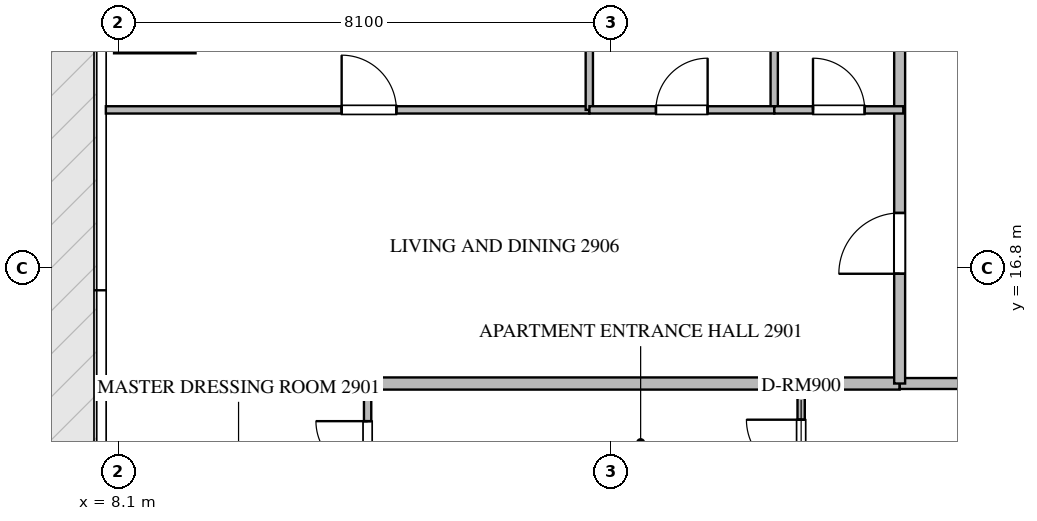
"""IFC4 building model, lengths in metres.
Left out: names, types, materials, properties, quantities, classifications, styles, units other than length and angle.
Written with IfcOpenShell. Run it as: python <this file> out.ifc"""

import sys

from ifc_helpers import new_model, si_unit, direction, frame, frame_2d, origin, place, context, subcontext, project, spatial, rectangle, extrude, source, transform, mapped, element, fill, save


model = new_model("IFC4")
c1 = context("Model", 3, precision=1e-05, world=origin(), true_north=direction((0.0, 1.0)))
c2 = subcontext(c1, "Body", "Model", "MODEL_VIEW")
j1 = project(units=[si_unit("LENGTHUNIT", "METRE"), si_unit("PLANEANGLEUNIT", "RADIAN")], contexts=[c1])
p1 = place(None, origin())
s1 = spatial("IfcSite", under=j1, at=p1, CompositionType="ELEMENT")
p2 = place(p1, origin())
s2 = spatial("IfcBuilding", under=s1, at=p2, CompositionType="ELEMENT")
p3 = place(p2, frame((0.0, 0.0, 120.15)))
s3 = spatial("IfcBuildingStorey", under=s2, at=p3, CompositionType="ELEMENT", Elevation=120.15)
p4 = place(p3, frame((7.882, 14.9, 0.0), z_axis=(0.0, 0.0, 1.0), x_axis=(1.0, 0.0, 0.0)))
e1 = element("IfcWall", 1, at=p4, inside=s3, PredefinedType="PARTITIONING", context=c2, shape_type="SweptSolid", body=[
    extrude(rectangle(XDim=13.068, YDim=0.2, at=frame_2d((6.534, 0.0))), origin(), (0.0, 0.0, 1.0), 3.49),
])
p5 = place(p3, frame((20.952, 14.9, 0.0), z_axis=(0.0, 0.0, 1.0), x_axis=(1.0, 0.0, 0.0)))
e2 = element("IfcWall", 2, at=p5, inside=s3, PredefinedType="PARTITIONING", context=c2, shape_type="SweptSolid", body=[
    extrude(rectangle(XDim=22.896, YDim=0.18, at=frame_2d((11.448, 0.0))), origin(), (0.0, 0.0, 1.0), 3.49),
])
p6 = place(p5, frame((2.781, 0.0, 0.0)))
e3 = element("IfcOpeningElement", 3, at=p6, cuts=e2, PredefinedType="OPENING", context=c2, shape_type="SweptSolid", body=[
    extrude(rectangle(XDim=1.0, YDim=2.15, at=frame_2d((0.5, 1.075))), frame((0.0, 0.1, 0.0), z_axis=(0.0, -1.0, 0.0), x_axis=(1.0, 0.0, 0.0)), (0.0, 0.0, 1.0), 0.2),
])
p7 = place(p5, frame((7.16, 0.0, 0.0)))
e4 = element("IfcOpeningElement", 4, at=p7, cuts=e2, PredefinedType="OPENING", context=c2, shape_type="SweptSolid", body=[
    extrude(rectangle(XDim=1.0, YDim=2.15, at=frame_2d((0.5, 1.075))), frame((0.0, 0.1, 0.0), z_axis=(0.0, -1.0, 0.0), x_axis=(1.0, 0.0, 0.0)), (0.0, 0.0, 1.0), 0.2),
])
p8 = place(p5, frame((19.115, 0.0, 0.0)))
e5 = element("IfcOpeningElement", 5, at=p8, cuts=e2, PredefinedType="OPENING", context=c2, shape_type="SweptSolid", body=[
    extrude(rectangle(XDim=1.0, YDim=2.15, at=frame_2d((0.5, 1.075))), frame((0.0, 0.1, 0.0), z_axis=(0.0, -1.0, 0.0), x_axis=(1.0, 0.0, 0.0)), (0.0, 0.0, 1.0), 0.2),
])
p9 = place(p3, frame((20.95, 14.9, 0.0), z_axis=(0.0, 0.0, 1.0), x_axis=(0.0, 1.0, 0.0)))
e6 = element("IfcWall", 6, at=p9, inside=s3, PredefinedType="PARTITIONING", context=c2, shape_type="SweptSolid", body=[
    extrude(rectangle(XDim=18.7, YDim=0.18, at=frame_2d((9.35, 0.0))), origin(), (0.0, 0.0, 1.0), 3.49),
])
p10 = place(p9, frame((1.805, 0.0, 0.0)))
e7 = element("IfcOpeningElement", 7, at=p10, cuts=e6, PredefinedType="OPENING", context=c2, shape_type="SweptSolid", body=[
    extrude(rectangle(XDim=1.0, YDim=2.15, at=frame_2d((0.5, 1.075))), frame((0.0, 0.1, 0.0), z_axis=(0.0, -1.0, 0.0), x_axis=(1.0, 0.0, 0.0)), (0.0, 0.0, 1.0), 0.2),
])
p11 = place(p9, frame((10.602, 0.0, 0.0)))
e8 = element("IfcOpeningElement", 8, at=p11, cuts=e6, PredefinedType="OPENING", context=c2, shape_type="SweptSolid", body=[
    extrude(rectangle(XDim=1.0, YDim=2.15, at=frame_2d((0.5, 1.075))), frame((0.0, 0.1, 0.0), z_axis=(0.0, -1.0, 0.0), x_axis=(1.0, 0.0, 0.0)), (0.0, 0.0, 1.0), 0.2),
])
p12 = place(p3, frame((19.33, 12.75, 0.0), z_axis=(0.0, 0.0, 1.0), x_axis=(0.0, 1.0, 0.0)))
e9 = element("IfcWall", 9, at=p12, inside=s3, PredefinedType="PARTITIONING", context=c2, shape_type="SweptSolid", body=[
    extrude(rectangle(XDim=2.21, YDim=0.12, at=frame_2d((1.105, 0.0))), origin(), (0.0, 0.0, 1.0), 3.49),
])
p13 = place(p12, frame((0.655, 0.0, 0.0)))
e10 = element("IfcOpeningElement", 10, at=p13, cuts=e9, PredefinedType="OPENING", context=c2, shape_type="SweptSolid", body=[
    extrude(rectangle(XDim=0.9, YDim=2.1, at=frame_2d((0.45, 1.05))), frame((0.0, 0.07, 0.0), z_axis=(0.0, -1.0, 0.0), x_axis=(1.0, 0.0, 0.0)), (0.0, 0.0, 1.0), 0.14),
])
p14 = place(p3, frame((12.2, 12.752, 0.0), z_axis=(0.0, 0.0, 1.0), x_axis=(0.0, 1.0, 0.0)))
e11 = element("IfcWall", 11, at=p14, inside=s3, PredefinedType="PARTITIONING", context=c2, shape_type="SweptSolid", body=[
    extrude(rectangle(XDim=2.208, YDim=0.12, at=frame_2d((1.104, 0.0))), origin(), (0.0, 0.0, 1.0), 3.49),
])
p15 = place(p14, frame((0.679, 0.0, 0.0)))
e12 = element("IfcOpeningElement", 12, at=p15, cuts=e11, PredefinedType="OPENING", context=c2, shape_type="SweptSolid", body=[
    extrude(rectangle(XDim=0.85, YDim=2.1, at=frame_2d((0.425, 1.05))), frame((0.0, 0.07, 0.0), z_axis=(0.0, -1.0, 0.0), x_axis=(1.0, 0.0, 0.0)), (0.0, 0.0, 1.0), 0.14),
])
p16 = place(p3, frame((7.895, 19.4, 0.0), z_axis=(0.0, 0.0, 1.0), x_axis=(1.0, 0.0, 0.0)))
e13 = element("IfcWall", 13, at=p16, inside=s3, PredefinedType="PARTITIONING", context=c2, shape_type="SweptSolid", body=[
    extrude(rectangle(XDim=7.951, YDim=0.12, at=frame_2d((3.976, 0.0))), origin(), (0.0, 0.0, 1.0), 3.49),
])
p17 = place(p16, frame((3.878, 0.0, 0.0)))
e14 = element("IfcOpeningElement", 14, at=p17, cuts=e13, PredefinedType="OPENING", context=c2, shape_type="SweptSolid", body=[
    extrude(rectangle(XDim=0.9, YDim=2.1, at=frame_2d((0.45, 1.05))), frame((0.0, 0.07, 0.0), z_axis=(0.0, -1.0, 0.0), x_axis=(1.0, 0.0, 0.0)), (0.0, 0.0, 1.0), 0.14),
])
for number, where, z_axis, x_axis in (
    (15, (15.846, 19.4, 0.0), (0.0, 0.0, 1.0), (0.0, 1.0, 0.0)),
    (16, (18.887, 19.4, 0.0), (0.0, 0.0, 1.0), (0.0, 1.0, 0.0)),
):
    element("IfcWall", number, at=place(p3, frame(where, z_axis=z_axis, x_axis=x_axis)), inside=s3, PredefinedType="PARTITIONING", context=c2, shape_type="SweptSolid", body=[
        extrude(rectangle(XDim=4.86, YDim=0.12, at=frame_2d((2.43, 0.0))), origin(), (0.0, 0.0, 1.0), 3.49),
    ])
p18 = place(p3, frame((15.848, 19.4, 0.0), z_axis=(0.0, 0.0, 1.0), x_axis=(1.0, 0.0, 0.0)))
e17 = element("IfcWall", 17, at=p18, inside=s3, PredefinedType="PARTITIONING", context=c2, shape_type="SweptSolid", body=[
    extrude(rectangle(XDim=3.039, YDim=0.12, at=frame_2d((1.52, 0.0))), origin(), (0.0, 0.0, 1.0), 3.49),
])
p19 = place(p18, frame((1.094, 0.0, 0.0)))
e18 = element("IfcOpeningElement", 18, at=p19, cuts=e17, PredefinedType="OPENING", context=c2, shape_type="SweptSolid", body=[
    extrude(rectangle(XDim=0.85, YDim=2.1, at=frame_2d((0.425, 1.05))), frame((0.0, 0.07, 0.0), z_axis=(0.0, -1.0, 0.0), x_axis=(1.0, 0.0, 0.0)), (0.0, 0.0, 1.0), 0.14),
])
p20 = place(p3, frame((18.889, 19.4, 0.0), z_axis=(0.0, 0.0, 1.0), x_axis=(1.0, 0.0, 0.0)))
e19 = element("IfcWall", 19, at=p20, inside=s3, PredefinedType="PARTITIONING", context=c2, shape_type="SweptSolid", body=[
    extrude(rectangle(XDim=2.121, YDim=0.12, at=frame_2d((1.061, 0.0))), origin(), (0.0, 0.0, 1.0), 3.49),
])
p21 = place(p20, frame((0.636, 0.0, 0.0)))
e20 = element("IfcOpeningElement", 20, at=p21, cuts=e19, PredefinedType="OPENING", context=c2, shape_type="SweptSolid", body=[
    extrude(rectangle(XDim=0.85, YDim=2.1, at=frame_2d((0.425, 1.05))), frame((0.0, 0.07, 0.0), z_axis=(0.0, -1.0, 0.0), x_axis=(1.0, 0.0, 0.0)), (0.0, 0.0, 1.0), 0.14),
])
m1 = source(origin(), c2, "Body", "SweptSolid", [
    extrude(rectangle(XDim=1.0, YDim=2.15, at=frame_2d((0.5, 1.075))), frame((0.0, 0.025, 0.0), z_axis=(0.0, -1.0, 0.0), x_axis=(1.0, 0.0, 0.0)), (0.0, 0.0, 1.0), 0.05),
])
p22 = place(p10, origin())
e21 = element("IfcDoor", 21, at=p22, inside=s3, OperationType="SINGLE_SWING_LEFT", PredefinedType="DOOR", context=c2, shape_type="MappedRepresentation", body=[
    mapped(m1, transform((0.0, 0.0, 0.0), scale=1.0)),
])
fill(e7, e21)
m2 = source(origin(), c2, "Body", "SweptSolid", [
    extrude(rectangle(XDim=0.9, YDim=2.1, at=frame_2d((0.45, 1.05))), frame((0.0, 0.025, 0.0), z_axis=(0.0, -1.0, 0.0), x_axis=(1.0, 0.0, 0.0)), (0.0, 0.0, 1.0), 0.05),
])
p23 = place(p13, origin())
e22 = element("IfcDoor", 22, at=p23, inside=s3, OperationType="SINGLE_SWING_RIGHT", PredefinedType="DOOR", context=c2, shape_type="MappedRepresentation", body=[
    mapped(m2, transform((0.0, 0.0, 0.0), scale=1.0)),
])
fill(e10, e22)
m3 = source(origin(), c2, "Body", "SweptSolid", [
    extrude(rectangle(XDim=0.85, YDim=2.1, at=frame_2d((0.425, 1.05))), frame((0.0, 0.025, 0.0), z_axis=(0.0, -1.0, 0.0), x_axis=(1.0, 0.0, 0.0)), (0.0, 0.0, 1.0), 0.05),
])
p24 = place(p15, origin())
e23 = element("IfcDoor", 23, at=p24, inside=s3, OperationType="SINGLE_SWING_RIGHT", PredefinedType="DOOR", context=c2, shape_type="MappedRepresentation", body=[
    mapped(m3, transform((0.0, 0.0, 0.0), scale=1.0)),
])
fill(e12, e23)
p25 = place(p17, origin())
e24 = element("IfcDoor", 24, at=p25, inside=s3, OperationType="SINGLE_SWING_LEFT", PredefinedType="DOOR", context=c2, shape_type="MappedRepresentation", body=[
    mapped(m2, transform((0.0, 0.0, 0.0), scale=1.0)),
])
fill(e14, e24)
p26 = place(p19, origin())
e25 = element("IfcDoor", 25, at=p26, inside=s3, OperationType="SINGLE_SWING_RIGHT", PredefinedType="DOOR", context=c2, shape_type="MappedRepresentation", body=[
    mapped(m3, transform((0.0, 0.0, 0.0), scale=1.0)),
])
fill(e18, e25)
p27 = place(p21, origin())
e26 = element("IfcDoor", 26, at=p27, inside=s3, OperationType="SINGLE_SWING_LEFT", PredefinedType="DOOR", context=c2, shape_type="MappedRepresentation", body=[
    mapped(m3, transform((0.0, 0.0, 0.0), scale=1.0)),
])
fill(e20, e26)
save(model, sys.argv[1])
